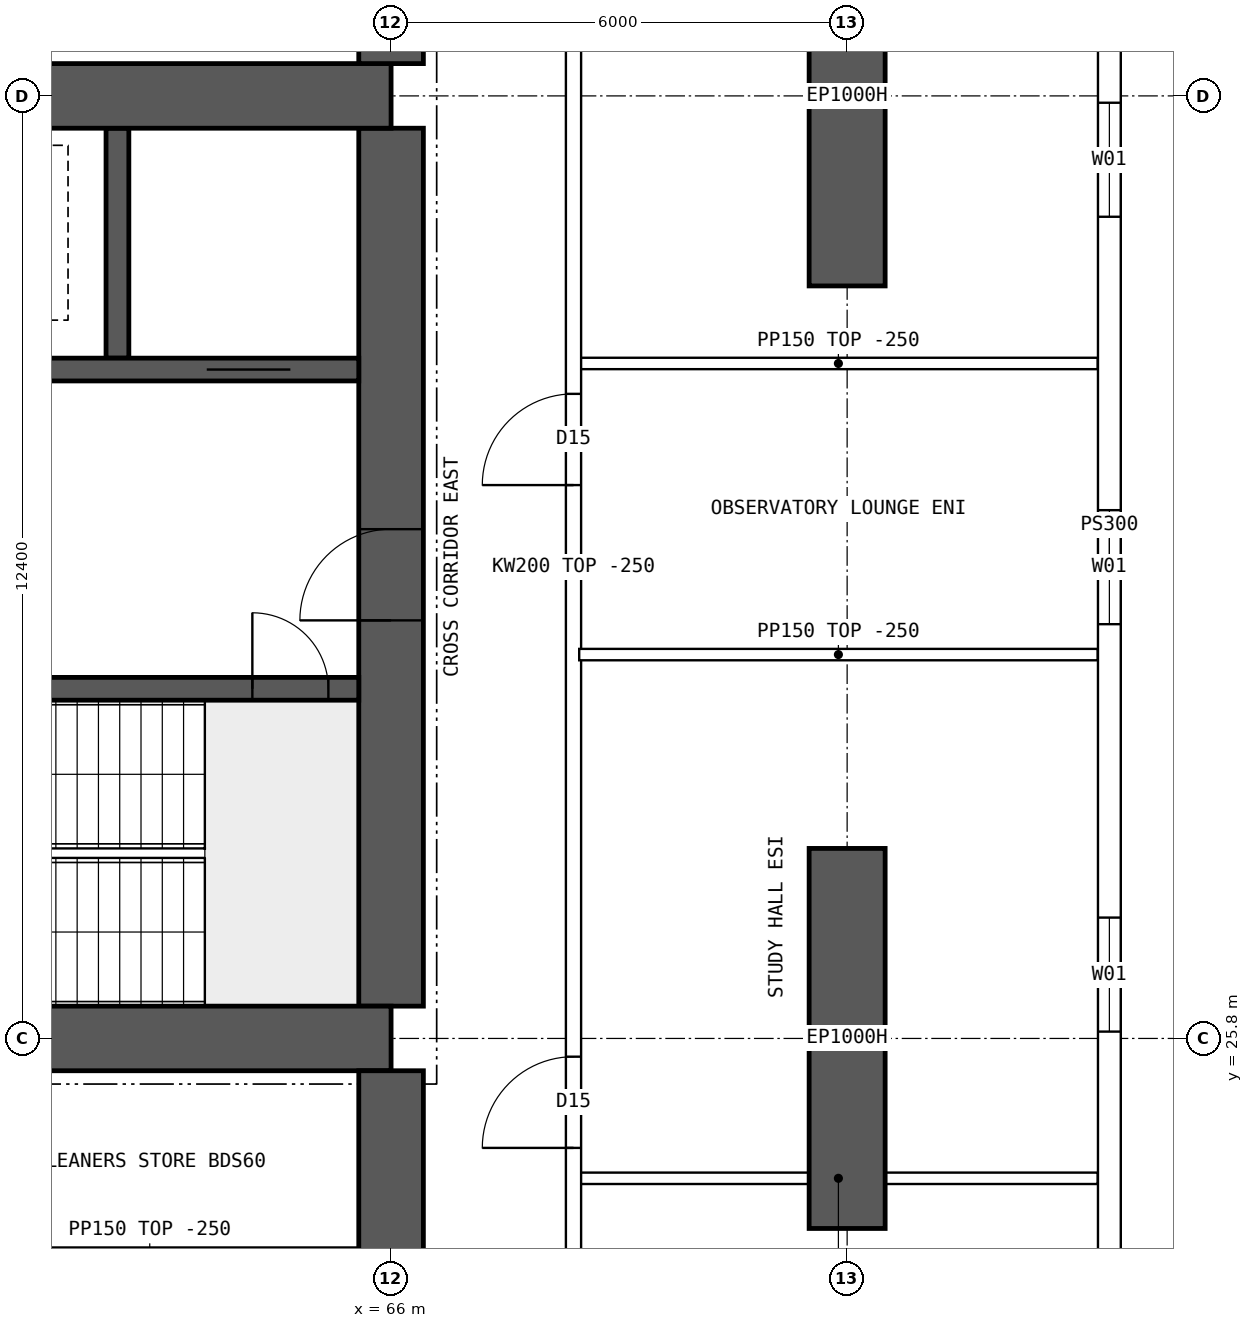
"""IFC4 building model, lengths in metres.
Left out: names, types, materials, properties, quantities, classifications, styles, units other than length and angle.
Written with IfcOpenShell. Run it as: python <this file> out.ifc"""

import sys

from ifc_helpers import new_model, si_unit, direction, frame, frame_2d, origin, place, context, subcontext, project, spatial, polyline, rectangle, outline, extrude, element, fill, save


model = new_model("IFC4")
c1 = context("Model", 3, precision=1e-05, world=origin(), true_north=direction((0.0, 1.0)))
c2 = subcontext(c1, "Body", "Model", "MODEL_VIEW")
j1 = project(units=[si_unit("LENGTHUNIT", "METRE"), si_unit("PLANEANGLEUNIT", "RADIAN")], contexts=[c1])
p1 = place(None, origin())
s1 = spatial("IfcSite", under=j1, at=p1, CompositionType="ELEMENT")
p2 = place(p1, origin())
s2 = spatial("IfcBuilding", under=s1, at=p2, CompositionType="ELEMENT")
p3 = place(p2, frame((0.0, 0.0, 156.1)))
s3 = spatial("IfcBuildingStorey", under=s2, at=p3, CompositionType="ELEMENT", Elevation=156.1)
for number, where, z_axis, x_axis in (
    (1, (72.0, 23.3, 0.0), (0.0, 0.0, 1.0), (0.0, 1.0, 0.0)),
    (2, (72.0, 35.7, 0.0), (0.0, 0.0, 1.0), (0.0, 1.0, 0.0)),
):
    element("IfcWall", number, at=place(p3, frame(where, z_axis=z_axis, x_axis=x_axis)), inside=s3, PredefinedType="SHEAR", context=c2, shape_type="SweptSolid", body=[
        extrude(rectangle(XDim=5.0, YDim=1.0, at=frame_2d((2.5, 0.0))), origin(), (0.0, 0.0, 1.0), 3.75),
    ])
for number, where, z_axis, x_axis in (
    (3, (18.0, 25.8, 0.0), (0.0, 0.0, 1.0), (1.0, 0.0, 0.0)),
    (4, (18.0, 38.2, 0.0), (0.0, 0.0, 1.0), (1.0, 0.0, 0.0)),
):
    element("IfcWall", number, at=place(p3, frame(where, z_axis=z_axis, x_axis=x_axis)), inside=s3, PredefinedType="SHEAR", context=c2, shape_type="SweptSolid", body=[
        extrude(rectangle(XDim=48.0, YDim=0.85, at=frame_2d((24.0, 0.0))), origin(), (0.0, 0.0, 1.0), 3.75),
    ])
p4 = place(p3, frame((66.0, 26.225, 0.0), z_axis=(0.0, 0.0, 1.0), x_axis=(0.0, 1.0, 0.0)))
e5 = element("IfcWall", 5, at=p4, inside=s3, PredefinedType="SHEAR", context=c2, shape_type="SweptSolid", body=[
    extrude(rectangle(XDim=11.55, YDim=0.85, at=frame_2d((5.775, 0.0))), origin(), (0.0, 0.0, 1.0), 3.75),
])
p5 = place(p4, frame((5.075, 0.0, 0.0)))
e6 = element("IfcOpeningElement", 6, at=p5, cuts=e5, PredefinedType="OPENING", context=c2, shape_type="SweptSolid", body=[
    extrude(rectangle(XDim=1.2, YDim=2.1, at=frame_2d((0.6, 1.05))), frame((0.0, 0.435, 0.0), z_axis=(0.0, -1.0, 0.0), x_axis=(1.0, 0.0, 0.0)), (0.0, 0.0, 1.0), 0.87),
])
p6 = place(p3, frame((18.425, 30.4, 0.0), z_axis=(0.0, 0.0, 1.0), x_axis=(1.0, 0.0, 0.0)))
e7 = element("IfcWall", 7, at=p6, inside=s3, PredefinedType="SHEAR", context=c2, shape_type="SweptSolid", body=[
    extrude(rectangle(XDim=47.15, YDim=0.3, at=frame_2d((23.575, 0.0))), origin(), (0.0, 0.0, 1.0), 3.75),
])
p7 = place(p6, frame((0.4, 0.0, 0.0)))
e8 = element("IfcOpeningElement", 8, at=p7, cuts=e7, PredefinedType="OPENING", context=c2, shape_type="SweptSolid", body=[
    extrude(rectangle(XDim=1.0, YDim=2.1, at=frame_2d((0.5, 1.05))), frame((0.0, 0.16, 0.0), z_axis=(0.0, -1.0, 0.0), x_axis=(1.0, 0.0, 0.0)), (0.0, 0.0, 1.0), 0.32),
])
p8 = place(p6, frame((45.75, 0.0, 0.0)))
e9 = element("IfcOpeningElement", 9, at=p8, cuts=e7, PredefinedType="OPENING", context=c2, shape_type="SweptSolid", body=[
    extrude(rectangle(XDim=1.0, YDim=2.1, at=frame_2d((0.5, 1.05))), frame((0.0, 0.16, 0.0), z_axis=(0.0, -1.0, 0.0), x_axis=(1.0, 0.0, 0.0)), (0.0, 0.0, 1.0), 0.32),
])
p9 = place(p6, frame((8.325, 0.0, 0.0)))
e10 = element("IfcOpeningElement", 10, at=p9, cuts=e7, PredefinedType="OPENING", context=c2, shape_type="SweptSolid", body=[
    extrude(rectangle(XDim=1.1, YDim=2.1, at=frame_2d((0.55, 1.05))), frame((0.0, 0.16, 0.0), z_axis=(0.0, -1.0, 0.0), x_axis=(1.0, 0.0, 0.0)), (0.0, 0.0, 1.0), 0.32),
])
p10 = place(p6, frame((10.925, 0.0, 0.0)))
e11 = element("IfcOpeningElement", 11, at=p10, cuts=e7, PredefinedType="OPENING", context=c2, shape_type="SweptSolid", body=[
    extrude(rectangle(XDim=1.1, YDim=2.1, at=frame_2d((0.55, 1.05))), frame((0.0, 0.16, 0.0), z_axis=(0.0, -1.0, 0.0), x_axis=(1.0, 0.0, 0.0)), (0.0, 0.0, 1.0), 0.32),
])
p11 = place(p6, frame((13.525, 0.0, 0.0)))
e12 = element("IfcOpeningElement", 12, at=p11, cuts=e7, PredefinedType="OPENING", context=c2, shape_type="SweptSolid", body=[
    extrude(rectangle(XDim=1.1, YDim=2.1, at=frame_2d((0.55, 1.05))), frame((0.0, 0.16, 0.0), z_axis=(0.0, -1.0, 0.0), x_axis=(1.0, 0.0, 0.0)), (0.0, 0.0, 1.0), 0.32),
])
p12 = place(p6, frame((16.125, 0.0, 0.0)))
e13 = element("IfcOpeningElement", 13, at=p12, cuts=e7, PredefinedType="OPENING", context=c2, shape_type="SweptSolid", body=[
    extrude(rectangle(XDim=1.1, YDim=2.1, at=frame_2d((0.55, 1.05))), frame((0.0, 0.16, 0.0), z_axis=(0.0, -1.0, 0.0), x_axis=(1.0, 0.0, 0.0)), (0.0, 0.0, 1.0), 0.32),
])
p13 = place(p6, frame((18.9, 0.0, 0.0)))
e14 = element("IfcOpeningElement", 14, at=p13, cuts=e7, PredefinedType="OPENING", context=c2, shape_type="SweptSolid", body=[
    extrude(rectangle(XDim=0.9, YDim=2.1, at=frame_2d((0.45, 1.05))), frame((0.0, 0.16, 0.0), z_axis=(0.0, -1.0, 0.0), x_axis=(1.0, 0.0, 0.0)), (0.0, 0.0, 1.0), 0.32),
])
p14 = place(p6, frame((30.192, 0.0, 0.0)))
e15 = element("IfcOpeningElement", 15, at=p14, cuts=e7, PredefinedType="OPENING", context=c2, shape_type="SweptSolid", body=[
    extrude(rectangle(XDim=1.1, YDim=2.1, at=frame_2d((0.55, 1.05))), frame((0.0, 0.16, 0.0), z_axis=(0.0, -1.0, 0.0), x_axis=(1.0, 0.0, 0.0)), (0.0, 0.0, 1.0), 0.32),
])
p15 = place(p6, frame((33.725, 0.0, 0.0)))
e16 = element("IfcOpeningElement", 16, at=p15, cuts=e7, PredefinedType="OPENING", context=c2, shape_type="SweptSolid", body=[
    extrude(rectangle(XDim=1.1, YDim=2.1, at=frame_2d((0.55, 1.05))), frame((0.0, 0.16, 0.0), z_axis=(0.0, -1.0, 0.0), x_axis=(1.0, 0.0, 0.0)), (0.0, 0.0, 1.0), 0.32),
])
p16 = place(p6, frame((37.258, 0.0, 0.0)))
e17 = element("IfcOpeningElement", 17, at=p16, cuts=e7, PredefinedType="OPENING", context=c2, shape_type="SweptSolid", body=[
    extrude(rectangle(XDim=1.1, YDim=2.1, at=frame_2d((0.55, 1.05))), frame((0.0, 0.16, 0.0), z_axis=(0.0, -1.0, 0.0), x_axis=(1.0, 0.0, 0.0)), (0.0, 0.0, 1.0), 0.32),
])
p17 = place(p3, frame((18.425, 34.6, 0.0), z_axis=(0.0, 0.0, 1.0), x_axis=(1.0, 0.0, 0.0)))
e18 = element("IfcWall", 18, at=p17, inside=s3, PredefinedType="SHEAR", context=c2, shape_type="SweptSolid", body=[
    extrude(rectangle(XDim=47.15, YDim=0.3, at=frame_2d((23.575, 0.0))), origin(), (0.0, 0.0, 1.0), 3.75),
])
p18 = place(p17, frame((0.9, 0.0, 0.0)))
e19 = element("IfcOpeningElement", 19, at=p18, cuts=e18, PredefinedType="OPENING", context=c2, shape_type="SweptSolid", body=[
    extrude(rectangle(XDim=1.1, YDim=2.1, at=frame_2d((0.55, 1.05))), frame((0.0, 0.16, 0.0), z_axis=(0.0, -1.0, 0.0), x_axis=(1.0, 0.0, 0.0)), (0.0, 0.0, 1.0), 0.32),
])
p19 = place(p17, frame((45.15, 0.0, 0.0)))
e20 = element("IfcOpeningElement", 20, at=p19, cuts=e18, PredefinedType="OPENING", context=c2, shape_type="SweptSolid", body=[
    extrude(rectangle(XDim=1.1, YDim=2.1, at=frame_2d((0.55, 1.05))), frame((0.0, 0.16, 0.0), z_axis=(0.0, -1.0, 0.0), x_axis=(1.0, 0.0, 0.0)), (0.0, 0.0, 1.0), 0.32),
])
p20 = place(p17, frame((4.175, 0.0, 0.0)))
e21 = element("IfcOpeningElement", 21, at=p20, cuts=e18, PredefinedType="OPENING", context=c2, shape_type="SweptSolid", body=[
    extrude(rectangle(XDim=0.9, YDim=2.1, at=frame_2d((0.45, 1.05))), frame((0.0, 0.16, 0.0), z_axis=(0.0, -1.0, 0.0), x_axis=(1.0, 0.0, 0.0)), (0.0, 0.0, 1.0), 0.32),
])
p21 = place(p17, frame((42.075, 0.0, 0.0)))
e22 = element("IfcOpeningElement", 22, at=p21, cuts=e18, PredefinedType="OPENING", context=c2, shape_type="SweptSolid", body=[
    extrude(rectangle(XDim=0.9, YDim=2.1, at=frame_2d((0.45, 1.05))), frame((0.0, 0.16, 0.0), z_axis=(0.0, -1.0, 0.0), x_axis=(1.0, 0.0, 0.0)), (0.0, 0.0, 1.0), 0.32),
])
p22 = place(p17, frame((8.95, 0.0, 0.0)))
e23 = element("IfcOpeningElement", 23, at=p22, cuts=e18, PredefinedType="OPENING", context=c2, shape_type="SweptSolid", body=[
    extrude(rectangle(XDim=0.9, YDim=2.1, at=frame_2d((0.45, 1.05))), frame((0.0, 0.16, 0.0), z_axis=(0.0, -1.0, 0.0), x_axis=(1.0, 0.0, 0.0)), (0.0, 0.0, 1.0), 0.32),
])
p23 = place(p17, frame((12.924, 0.0, 0.0)))
e24 = element("IfcOpeningElement", 24, at=p23, cuts=e18, PredefinedType="OPENING", context=c2, shape_type="SweptSolid", body=[
    extrude(rectangle(XDim=0.9, YDim=2.1, at=frame_2d((0.45, 1.05))), frame((0.0, 0.16, 0.0), z_axis=(0.0, -1.0, 0.0), x_axis=(1.0, 0.0, 0.0)), (0.0, 0.0, 1.0), 0.32),
])
p24 = place(p17, frame((16.571, 0.0, 0.0)))
e25 = element("IfcOpeningElement", 25, at=p24, cuts=e18, PredefinedType="OPENING", context=c2, shape_type="SweptSolid", body=[
    extrude(rectangle(XDim=0.9, YDim=2.1, at=frame_2d((0.45, 1.05))), frame((0.0, 0.16, 0.0), z_axis=(0.0, -1.0, 0.0), x_axis=(1.0, 0.0, 0.0)), (0.0, 0.0, 1.0), 0.32),
])
p25 = place(p17, frame((20.33, 0.0, 0.0)))
e26 = element("IfcOpeningElement", 26, at=p25, cuts=e18, PredefinedType="OPENING", context=c2, shape_type="SweptSolid", body=[
    extrude(rectangle(XDim=0.9, YDim=2.1, at=frame_2d((0.45, 1.05))), frame((0.0, 0.16, 0.0), z_axis=(0.0, -1.0, 0.0), x_axis=(1.0, 0.0, 0.0)), (0.0, 0.0, 1.0), 0.32),
])
p26 = place(p17, frame((24.736, 0.0, 0.0)))
e27 = element("IfcOpeningElement", 27, at=p26, cuts=e18, PredefinedType="OPENING", context=c2, shape_type="SweptSolid", body=[
    extrude(rectangle(XDim=0.9, YDim=2.1, at=frame_2d((0.45, 1.05))), frame((0.0, 0.16, 0.0), z_axis=(0.0, -1.0, 0.0), x_axis=(1.0, 0.0, 0.0)), (0.0, 0.0, 1.0), 0.32),
])
p27 = place(p17, frame((27.533, 0.0, 0.0)))
e28 = element("IfcOpeningElement", 28, at=p27, cuts=e18, PredefinedType="OPENING", context=c2, shape_type="SweptSolid", body=[
    extrude(rectangle(XDim=0.9, YDim=2.1, at=frame_2d((0.45, 1.05))), frame((0.0, 0.16, 0.0), z_axis=(0.0, -1.0, 0.0), x_axis=(1.0, 0.0, 0.0)), (0.0, 0.0, 1.0), 0.32),
])
p28 = place(p17, frame((29.906, 0.0, 0.0)))
e29 = element("IfcOpeningElement", 29, at=p28, cuts=e18, PredefinedType="OPENING", context=c2, shape_type="SweptSolid", body=[
    extrude(rectangle(XDim=0.9, YDim=2.1, at=frame_2d((0.45, 1.05))), frame((0.0, 0.16, 0.0), z_axis=(0.0, -1.0, 0.0), x_axis=(1.0, 0.0, 0.0)), (0.0, 0.0, 1.0), 0.32),
])
p29 = place(p17, frame((35.376, 0.0, 0.0)))
e30 = element("IfcOpeningElement", 30, at=p29, cuts=e18, PredefinedType="OPENING", context=c2, shape_type="SweptSolid", body=[
    extrude(rectangle(XDim=0.9, YDim=2.1, at=frame_2d((0.45, 1.05))), frame((0.0, 0.16, 0.0), z_axis=(0.0, -1.0, 0.0), x_axis=(1.0, 0.0, 0.0)), (0.0, 0.0, 1.0), 0.32),
])
p30 = place(p3, frame((62.4, 34.75, 0.0), z_axis=(0.0, 0.0, 1.0), x_axis=(0.0, 1.0, 0.0)))
e31 = element("IfcWall", 31, at=p30, inside=s3, PredefinedType="SHEAR", context=c2, shape_type="SweptSolid", body=[
    extrude(rectangle(XDim=3.025, YDim=0.3, at=frame_2d((1.512, 0.0))), origin(), (0.0, 0.0, 1.0), 3.75),
])
for number, where, z_axis, x_axis in (
    (32, (66.0, 17.2, 0.0), (0.0, 0.0, 1.0), (0.0, 1.0, 0.0)),
    (33, (66.0, 38.625, 0.0), (0.0, 0.0, 1.0), (0.0, 1.0, 0.0)),
):
    element("IfcWall", number, at=place(p3, frame(where, z_axis=z_axis, x_axis=x_axis)), inside=s3, PredefinedType="SHEAR", context=c2, shape_type="SweptSolid", body=[
        extrude(rectangle(XDim=8.175, YDim=0.85, at=frame_2d((4.087, 0.0))), origin(), (0.0, 0.0, 1.0), 3.75),
    ])
p31 = place(p3, frame((75.45, 18.6, 0.0), z_axis=(0.0, 0.0, 1.0), x_axis=(0.0, 1.0, 0.0)))
e34 = element("IfcWall", 34, at=p31, inside=s3, PredefinedType="SOLIDWALL", context=c2, shape_type="SweptSolid", body=[
    extrude(outline(polyline([(-0.015, -0.15), (26.815, -0.15), (26.785, 0.15), (0.015, 0.15), (-0.015, -0.15)])), origin(), (0.0, 0.0, 1.0), 3.5),
])
p32 = place(p31, frame((1.93, 0.0, 0.9)))
e35 = element("IfcOpeningElement", 35, at=p32, cuts=e34, PredefinedType="OPENING", context=c2, shape_type="SweptSolid", body=[
    extrude(rectangle(XDim=1.5, YDim=2.0, at=frame_2d((0.75, 1.0))), frame((0.0, 0.16, 0.0), z_axis=(0.0, -1.0, 0.0), x_axis=(1.0, 0.0, 0.0)), (0.0, 0.0, 1.0), 0.32),
])
p33 = place(p31, frame((7.29, 0.0, 0.9)))
e36 = element("IfcOpeningElement", 36, at=p33, cuts=e34, PredefinedType="OPENING", context=c2, shape_type="SweptSolid", body=[
    extrude(rectangle(XDim=1.5, YDim=2.0, at=frame_2d((0.75, 1.0))), frame((0.0, 0.16, 0.0), z_axis=(0.0, -1.0, 0.0), x_axis=(1.0, 0.0, 0.0)), (0.0, 0.0, 1.0), 0.32),
])
p34 = place(p31, frame((12.65, 0.0, 0.9)))
e37 = element("IfcOpeningElement", 37, at=p34, cuts=e34, PredefinedType="OPENING", context=c2, shape_type="SweptSolid", body=[
    extrude(rectangle(XDim=1.5, YDim=2.0, at=frame_2d((0.75, 1.0))), frame((0.0, 0.16, 0.0), z_axis=(0.0, -1.0, 0.0), x_axis=(1.0, 0.0, 0.0)), (0.0, 0.0, 1.0), 0.32),
])
p35 = place(p31, frame((18.01, 0.0, 0.9)))
e38 = element("IfcOpeningElement", 38, at=p35, cuts=e34, PredefinedType="OPENING", context=c2, shape_type="SweptSolid", body=[
    extrude(rectangle(XDim=1.5, YDim=2.0, at=frame_2d((0.75, 1.0))), frame((0.0, 0.16, 0.0), z_axis=(0.0, -1.0, 0.0), x_axis=(1.0, 0.0, 0.0)), (0.0, 0.0, 1.0), 0.32),
])
p36 = place(p31, frame((23.37, 0.0, 0.9)))
e39 = element("IfcOpeningElement", 39, at=p36, cuts=e34, PredefinedType="OPENING", context=c2, shape_type="SweptSolid", body=[
    extrude(rectangle(XDim=1.5, YDim=2.0, at=frame_2d((0.75, 1.0))), frame((0.0, 0.16, 0.0), z_axis=(0.0, -1.0, 0.0), x_axis=(1.0, 0.0, 0.0)), (0.0, 0.0, 1.0), 0.32),
])
p37 = place(p3, frame((60.075, 22.975, 0.0), z_axis=(0.0, 0.0, 1.0), x_axis=(1.0, 0.0, 0.0)))
e40 = element("IfcWall", 40, at=p37, inside=s3, PredefinedType="PARTITIONING", context=c2, shape_type="SweptSolid", body=[
    extrude(rectangle(XDim=5.5, YDim=0.15, at=frame_2d((2.75, 0.0))), origin(), (0.0, 0.0, 1.0), 3.5),
])
p38 = place(p37, frame((0.4, 0.0, 0.0)))
e41 = element("IfcOpeningElement", 41, at=p38, cuts=e40, PredefinedType="OPENING", context=c2, shape_type="SweptSolid", body=[
    extrude(rectangle(XDim=1.0, YDim=2.1, at=frame_2d((0.5, 1.05))), frame((0.0, 0.085, 0.0), z_axis=(0.0, -1.0, 0.0), x_axis=(1.0, 0.0, 0.0)), (0.0, 0.0, 1.0), 0.17),
])
p39 = place(p3, frame((68.475, 30.85, 0.0), z_axis=(0.0, 0.0, 1.0), x_axis=(1.0, 0.0, 0.0)))
e42 = element("IfcWall", 42, at=p39, inside=s3, PredefinedType="PARTITIONING", context=c2, shape_type="SweptSolid", body=[
    extrude(outline(polyline([(0.0, 0.0), (6.82, 0.0), (6.82, 3.5), (3.827, 3.5), (3.825, 3.05), (3.227, 3.05), (3.225, 3.5), (0.0, 3.5), (0.0, 0.0)])), frame((0.0, 0.075, 0.0), z_axis=(0.0, -1.0, 0.0), x_axis=(1.0, 0.0, 0.0)), (0.0, 0.0, 1.0), 0.15),
])
p40 = place(p3, frame((68.4, 10.446, 0.0), z_axis=(0.0, 0.0, 1.0), x_axis=(0.0, 1.0, 0.0)))
e43 = element("IfcWall", 43, at=p40, inside=s3, PredefinedType="SOLIDWALL", context=c2, shape_type="SweptSolid", body=[
    extrude(rectangle(XDim=43.107, YDim=0.2, at=frame_2d((21.554, 0.0))), origin(), (0.0, 0.0, 1.0), 3.5),
])
p41 = place(p40, frame((13.914, 0.0, 0.0)))
e44 = element("IfcOpeningElement", 44, at=p41, cuts=e43, PredefinedType="OPENING", context=c2, shape_type="SweptSolid", body=[
    extrude(rectangle(XDim=1.2, YDim=2.1, at=frame_2d((0.6, 1.05))), frame((0.0, 0.11, 0.0), z_axis=(0.0, -1.0, 0.0), x_axis=(1.0, 0.0, 0.0)), (0.0, 0.0, 1.0), 0.22),
])
p42 = place(p40, frame((22.634, 0.0, 0.0)))
e45 = element("IfcOpeningElement", 45, at=p42, cuts=e43, PredefinedType="OPENING", context=c2, shape_type="SweptSolid", body=[
    extrude(rectangle(XDim=1.2, YDim=2.1, at=frame_2d((0.6, 1.05))), frame((0.0, 0.11, 0.0), z_axis=(0.0, -1.0, 0.0), x_axis=(1.0, 0.0, 0.0)), (0.0, 0.0, 1.0), 0.22),
])
p43 = place(p40, frame((5.104, 0.0, 0.0)))
e46 = element("IfcOpeningElement", 46, at=p43, cuts=e43, PredefinedType="OPENING", context=c2, shape_type="SweptSolid", body=[
    extrude(rectangle(XDim=1.4, YDim=2.1, at=frame_2d((0.7, 1.05))), frame((0.0, 0.11, 0.0), z_axis=(0.0, -1.0, 0.0), x_axis=(1.0, 0.0, 0.0)), (0.0, 0.0, 1.0), 0.22),
])
p44 = place(p40, frame((36.504, 0.0, 0.0)))
e47 = element("IfcOpeningElement", 47, at=p44, cuts=e43, PredefinedType="OPENING", context=c2, shape_type="SweptSolid", body=[
    extrude(rectangle(XDim=1.4, YDim=2.1, at=frame_2d((0.7, 1.05))), frame((0.0, 0.11, 0.0), z_axis=(0.0, -1.0, 0.0), x_axis=(1.0, 0.0, 0.0)), (0.0, 0.0, 1.0), 0.22),
])
p45 = place(p3, frame((68.475, 23.96, 0.0), z_axis=(0.0, 0.0, 1.0), x_axis=(1.0, 0.0, 0.0)))
e48 = element("IfcWall", 48, at=p45, inside=s3, PredefinedType="PARTITIONING", context=c2, shape_type="SweptSolid", body=[
    extrude(rectangle(XDim=6.82, YDim=0.15, at=frame_2d((3.41, 0.0))), origin(), (0.0, 0.0, 1.0), 3.5),
])
p46 = place(p3, frame((68.475, 34.68, 0.0), z_axis=(0.0, 0.0, 1.0), x_axis=(1.0, 0.0, 0.0)))
e49 = element("IfcWall", 49, at=p46, inside=s3, PredefinedType="PARTITIONING", context=c2, shape_type="SweptSolid", body=[
    extrude(outline(polyline([(0.0, 0.0), (6.82, 0.0), (6.82, 3.5), (3.827, 3.5), (3.825, 3.05), (3.227, 3.05), (3.225, 3.5), (0.0, 3.5), (0.0, 0.0)])), frame((0.0, 0.075, 0.0), z_axis=(0.0, -1.0, 0.0), x_axis=(1.0, 0.0, 0.0)), (0.0, 0.0, 1.0), 0.15),
])
p47 = place(p33, origin())
e50 = element("IfcWindow", 50, at=p47, inside=s3, PartitioningType="SINGLE_PANEL", PredefinedType="WINDOW", context=c2, shape_type="SweptSolid", body=[
    extrude(rectangle(XDim=1.5, YDim=2.0, at=frame_2d((0.75, 1.0))), frame((0.0, 0.03, 0.0), z_axis=(0.0, -1.0, 0.0), x_axis=(1.0, 0.0, 0.0)), (0.0, 0.0, 1.0), 0.06),
])
fill(e36, e50)
p48 = place(p34, origin())
e51 = element("IfcWindow", 51, at=p48, inside=s3, PartitioningType="SINGLE_PANEL", PredefinedType="WINDOW", context=c2, shape_type="SweptSolid", body=[
    extrude(rectangle(XDim=1.5, YDim=2.0, at=frame_2d((0.75, 1.0))), frame((0.0, 0.03, 0.0), z_axis=(0.0, -1.0, 0.0), x_axis=(1.0, 0.0, 0.0)), (0.0, 0.0, 1.0), 0.06),
])
fill(e37, e51)
p49 = place(p35, origin())
e52 = element("IfcWindow", 52, at=p49, inside=s3, PartitioningType="SINGLE_PANEL", PredefinedType="WINDOW", context=c2, shape_type="SweptSolid", body=[
    extrude(rectangle(XDim=1.5, YDim=2.0, at=frame_2d((0.75, 1.0))), frame((0.0, 0.03, 0.0), z_axis=(0.0, -1.0, 0.0), x_axis=(1.0, 0.0, 0.0)), (0.0, 0.0, 1.0), 0.06),
])
fill(e38, e52)
p50 = place(p5, origin())
e53 = element("IfcDoor", 53, at=p50, inside=s3, OperationType="SINGLE_SWING_LEFT", PredefinedType="DOOR", context=c2, shape_type="SweptSolid", body=[
    extrude(rectangle(XDim=1.2, YDim=2.1, at=frame_2d((0.6, 1.05))), frame((0.0, 0.025, 0.0), z_axis=(0.0, -1.0, 0.0), x_axis=(1.0, 0.0, 0.0)), (0.0, 0.0, 1.0), 0.05),
])
fill(e6, e53)
p51 = place(p8, origin())
e54 = element("IfcDoor", 54, at=p51, inside=s3, OperationType="SINGLE_SWING_LEFT", PredefinedType="DOOR", context=c2, shape_type="SweptSolid", body=[
    extrude(rectangle(XDim=1.0, YDim=2.1, at=frame_2d((0.5, 1.05))), frame((0.0, 0.025, 0.0), z_axis=(0.0, -1.0, 0.0), x_axis=(1.0, 0.0, 0.0)), (0.0, 0.0, 1.0), 0.05),
])
fill(e9, e54)
p52 = place(p19, origin())
e55 = element("IfcDoor", 55, at=p52, inside=s3, OperationType="DOUBLE_DOOR_SLIDING", PredefinedType="DOOR", context=c2, shape_type="SweptSolid", body=[
    extrude(rectangle(XDim=1.1, YDim=2.1, at=frame_2d((0.55, 1.05))), frame((0.0, 0.025, 0.0), z_axis=(0.0, -1.0, 0.0), x_axis=(1.0, 0.0, 0.0)), (0.0, 0.0, 1.0), 0.05),
])
fill(e20, e55)
p53 = place(p41, origin())
e56 = element("IfcDoor", 56, at=p53, inside=s3, OperationType="SINGLE_SWING_LEFT", PredefinedType="DOOR", context=c2, shape_type="SweptSolid", body=[
    extrude(rectangle(XDim=1.2, YDim=2.1, at=frame_2d((0.6, 1.05))), frame((0.0, 0.025, 0.0), z_axis=(0.0, -1.0, 0.0), x_axis=(1.0, 0.0, 0.0)), (0.0, 0.0, 1.0), 0.05),
])
fill(e44, e56)
p54 = place(p42, origin())
e57 = element("IfcDoor", 57, at=p54, inside=s3, OperationType="SINGLE_SWING_LEFT", PredefinedType="DOOR", context=c2, shape_type="SweptSolid", body=[
    extrude(rectangle(XDim=1.2, YDim=2.1, at=frame_2d((0.6, 1.05))), frame((0.0, 0.025, 0.0), z_axis=(0.0, -1.0, 0.0), x_axis=(1.0, 0.0, 0.0)), (0.0, 0.0, 1.0), 0.05),
])
fill(e45, e57)
save(model, sys.argv[1])
